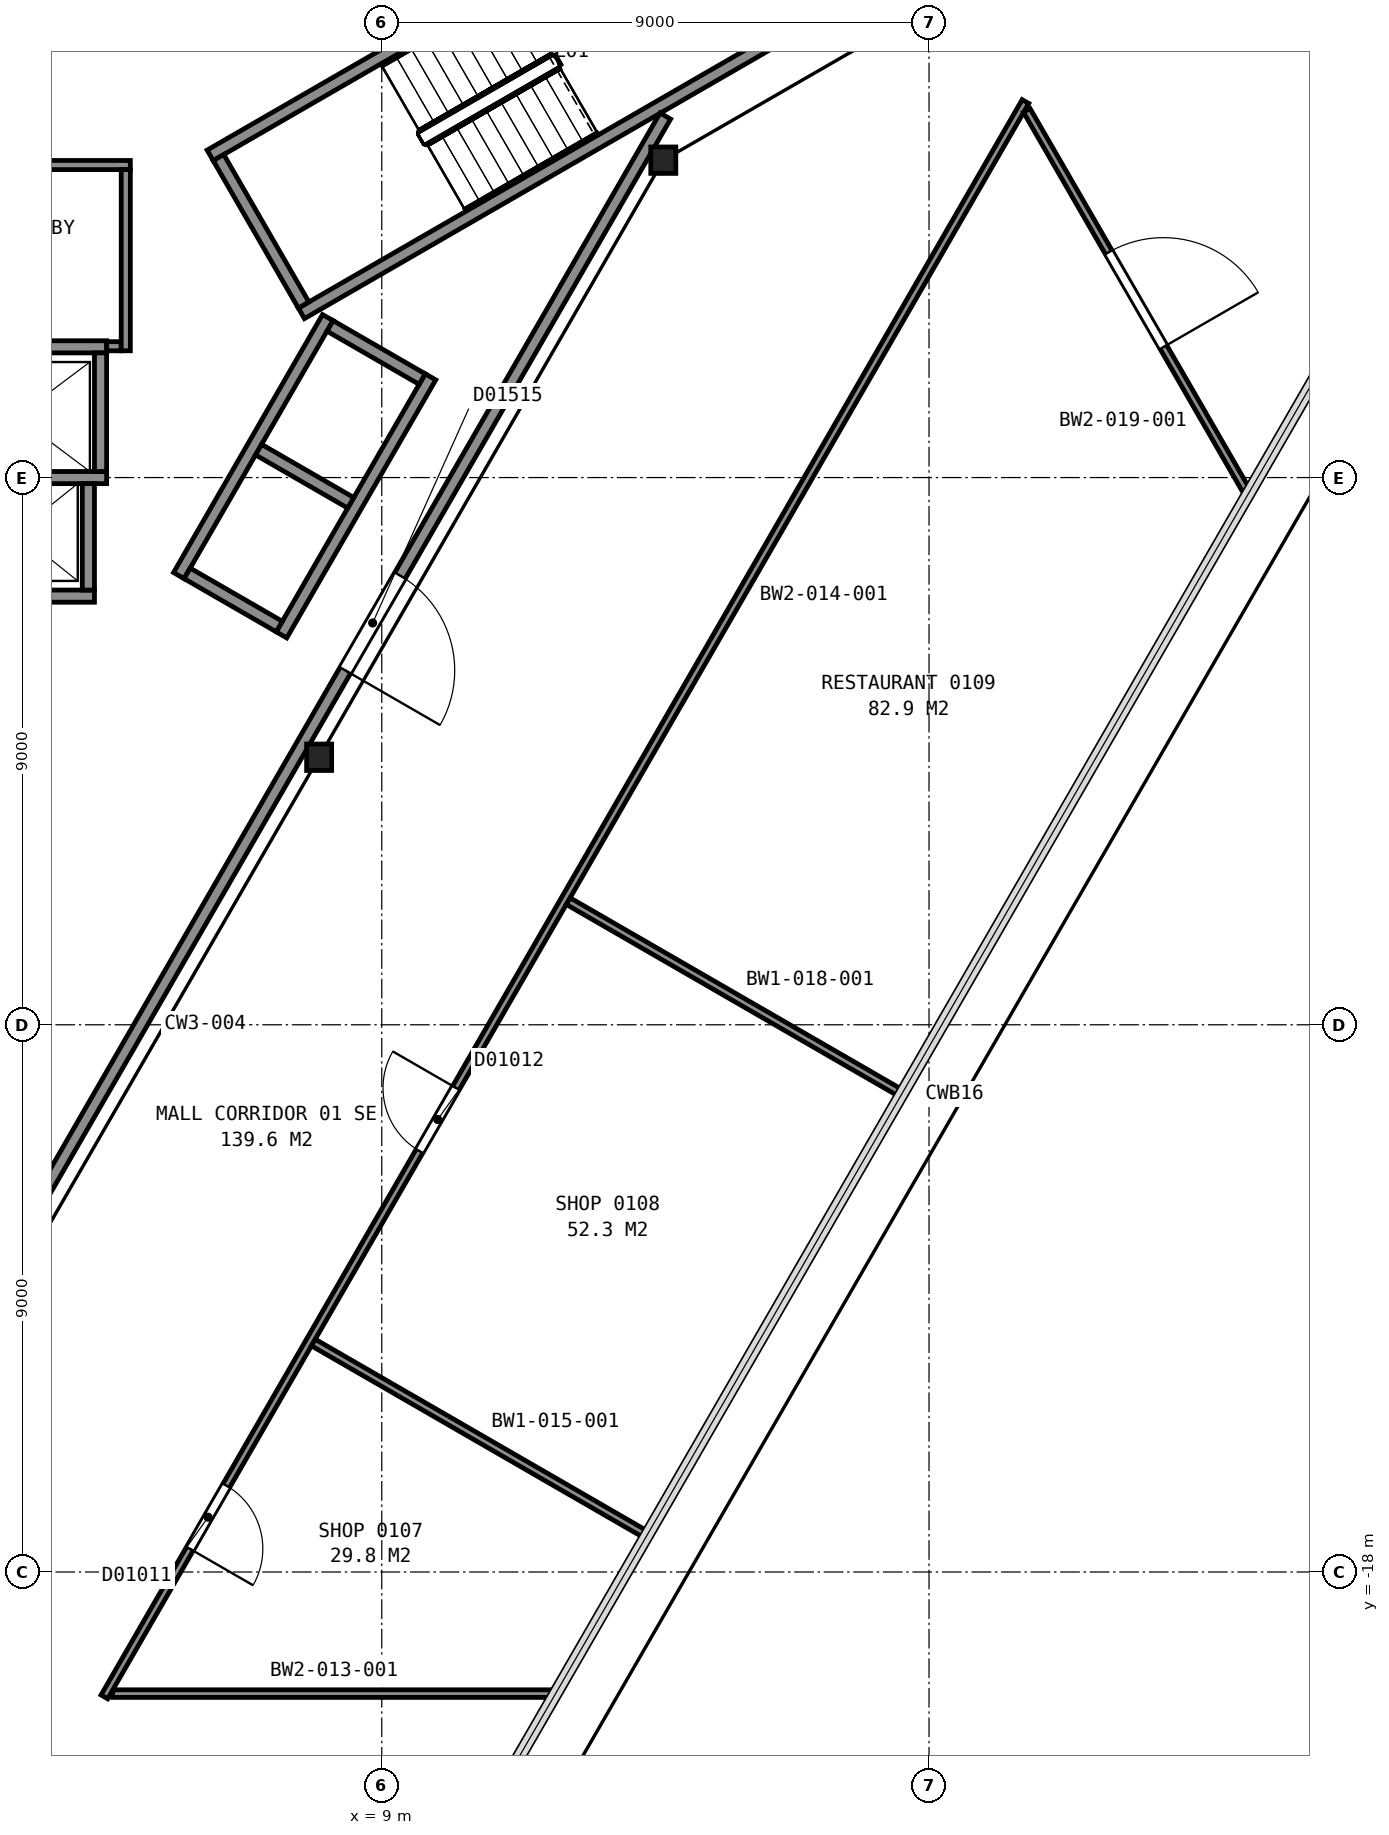
"""IFC4 building model, lengths in metres.
Left out: names, types, materials, properties, quantities, classifications, styles, units other than length and angle.
Written with IfcOpenShell. Run it as: python <this file> out.ifc"""

import sys

from ifc_helpers import new_model, si_unit, direction, frame, frame_2d, origin, origin_2d, place, context, subcontext, project, spatial, rectangle, i_section, extrude, element, fill, save


model = new_model("IFC4")
c1 = context("Model", 3, precision=1e-05, world=origin(), true_north=direction((0.0, 1.0)))
c2 = subcontext(c1, "Body", "Model", "MODEL_VIEW")
j1 = project(units=[si_unit("LENGTHUNIT", "METRE"), si_unit("PLANEANGLEUNIT", "RADIAN")], contexts=[c1])
p1 = place(None, origin())
s1 = spatial("IfcSite", under=j1, at=p1, CompositionType="ELEMENT")
p2 = place(p1, origin())
s2 = spatial("IfcBuilding", under=s1, at=p2, CompositionType="ELEMENT")
p3 = place(p2, frame((0.0, 0.0, 12.0)))
s3 = spatial("IfcBuildingStorey", under=s2, at=p3, CompositionType="ELEMENT", Elevation=12.0)
for number, where, z_axis, x_axis in (
    (1, (13.63, 5.22, 0.0), (0.0, 0.0, 1.0), (1.0, 0.0, 0.0)),
    (2, (7.97, -4.6, 0.0), (0.0, 0.0, 1.0), (1.0, 0.0, 0.0)),
):
    element("IfcColumn", number, at=place(p3, frame(where, z_axis=z_axis, x_axis=x_axis)), inside=s3, PredefinedType="COLUMN", context=c2, shape_type="SweptSolid", body=[
        extrude(i_section(OverallWidth=0.411, OverallDepth=0.434, WebThickness=0.036, FlangeThickness=0.057, FilletRadius=0.015, at=origin_2d()), origin(), (0.0, 0.0, 1.0), 5.4),
    ])
for number, where, z_axis, x_axis in (
    (3, (6.178, 5.299, 0.0), (0.0, 0.0, 1.0), (0.866, 0.5, 0.0)),
    (4, (7.678, 2.701, 0.0), (0.0, 0.0, 1.0), (0.866, 0.5, 0.0)),
):
    element("IfcWall", number, at=place(p3, frame(where, z_axis=z_axis, x_axis=x_axis)), inside=s3, PredefinedType="PARTITIONING", context=c2, shape_type="SweptSolid", body=[
        extrude(rectangle(XDim=12.0, YDim=0.2, at=frame_2d((6.0, 0.0))), origin(), (0.0, 0.0, 1.0), 5.15),
    ])
p4 = place(p3, frame((7.715, 2.838, 0.0), z_axis=(0.0, 0.0, 1.0), x_axis=(-0.500049511043, 0.865996816683, 0.0)))
e5 = element("IfcWall", 5, at=p4, inside=s3, PredefinedType="PARTITIONING", context=c2, shape_type="SweptSolid", body=[
    extrude(rectangle(XDim=2.8, YDim=0.2, at=frame_2d((1.4, 0.0))), origin(), (0.0, 0.0, 1.0), 5.15),
])
p5 = place(p3, frame((1.725, -1.95, 0.0), z_axis=(0.0, 0.0, 1.0), x_axis=(1.0, 0.0, 0.0)))
e6 = element("IfcWall", 6, at=p5, inside=s3, PredefinedType="PARTITIONING", context=c2, shape_type="SweptSolid", body=[
    extrude(rectangle(XDim=2.55, YDim=0.2, at=frame_2d((1.275, 0.0))), origin(), (0.0, 0.0, 1.0), 5.4),
])
p6 = place(p5, frame((0.725, 0.0, 0.0)))
e7 = element("IfcOpeningElement", 7, at=p6, cuts=e6, PredefinedType="OPENING", context=c2, shape_type="SweptSolid", body=[
    extrude(rectangle(XDim=1.1, YDim=2.1, at=frame_2d((0.55, 1.05))), frame((0.0, 0.11, 0.0), z_axis=(0.0, -1.0, 0.0), x_axis=(1.0, 0.0, 0.0)), (0.0, 0.0, 1.0), 0.22),
])
p7 = place(p3, frame((1.525, 0.0, 0.0), z_axis=(0.0, 0.0, 1.0), x_axis=(1.0, 0.0, 0.0)))
e8 = element("IfcWall", 8, at=p7, inside=s3, PredefinedType="PARTITIONING", context=c2, shape_type="SweptSolid", body=[
    extrude(rectangle(XDim=2.95, YDim=0.2, at=frame_2d((1.475, 0.0))), origin(), (0.0, 0.0, 1.0), 5.4),
])
p8 = place(p3, frame((1.525, 2.15, 0.0), z_axis=(0.0, 0.0, 1.0), x_axis=(1.0, 0.0, 0.0)))
e9 = element("IfcWall", 9, at=p8, inside=s3, PredefinedType="PARTITIONING", context=c2, shape_type="SweptSolid", body=[
    extrude(rectangle(XDim=2.95, YDim=0.2, at=frame_2d((1.475, 0.0))), origin(), (0.0, 0.0, 1.0), 5.4),
])
p9 = place(p8, frame((0.925, 0.0, 0.0)))
e10 = element("IfcOpeningElement", 10, at=p9, cuts=e9, PredefinedType="OPENING", context=c2, shape_type="SweptSolid", body=[
    extrude(rectangle(XDim=1.1, YDim=2.1, at=frame_2d((0.55, 1.05))), frame((0.0, 0.11, 0.0), z_axis=(0.0, -1.0, 0.0), x_axis=(1.0, 0.0, 0.0)), (0.0, 0.0, 1.0), 0.22),
])
p10 = place(p3, frame((7.351, -2.587, 0.0), z_axis=(0.0, 0.0, 1.0), x_axis=(0.500002801628, 0.866023786258, 0.0)))
e11 = element("IfcWall", 11, at=p10, inside=s3, PredefinedType="PARTITIONING", context=c2, shape_type="SweptSolid", body=[
    extrude(rectangle(XDim=4.9, YDim=0.2, at=frame_2d((2.45, 0.0))), origin(), (0.0, 0.0, 1.0), 5.4),
])
p11 = place(p3, frame((5.663, -1.612, 0.0), z_axis=(0.0, 0.0, 1.0), x_axis=(0.49998122708, 0.866036242063, 0.0)))
e12 = element("IfcWall", 12, at=p11, inside=s3, PredefinedType="PARTITIONING", context=c2, shape_type="SweptSolid", body=[
    extrude(rectangle(XDim=4.9, YDim=0.2, at=frame_2d((2.45, 0.0))), origin(), (0.0, 0.0, 1.0), 5.4),
])
p12 = place(p3, frame((4.375, 0.1, 0.0), z_axis=(0.0, 0.0, 1.0), x_axis=(0.0, 1.0, 0.0)))
e13 = element("IfcWall", 13, at=p12, inside=s3, PredefinedType="PARTITIONING", context=c2, shape_type="SweptSolid", body=[
    extrude(rectangle(XDim=1.95, YDim=0.2, at=frame_2d((0.975, 0.0))), origin(), (0.0, 0.0, 1.0), 5.4),
])
p13 = place(p3, frame((4.175, -1.85, 0.0), z_axis=(0.0, 0.0, 1.0), x_axis=(0.0, 1.0, 0.0)))
e14 = element("IfcWall", 14, at=p13, inside=s3, PredefinedType="PARTITIONING", context=c2, shape_type="SweptSolid", body=[
    extrude(rectangle(XDim=1.75, YDim=0.2, at=frame_2d((0.875, 0.0))), origin(), (0.0, 0.0, 1.0), 5.4),
])
p14 = place(p3, frame((9.665, 1.62, 0.0), z_axis=(0.0, 0.0, 1.0), x_axis=(-0.866002029911, 0.500040482552, 0.0)))
e15 = element("IfcWall", 15, at=p14, inside=s3, PredefinedType="PARTITIONING", context=c2, shape_type="SweptSolid", body=[
    extrude(rectangle(XDim=1.75, YDim=0.2, at=frame_2d((0.875, 0.0))), origin(), (0.0, 0.0, 1.0), 5.4),
])
for number, where, z_axis, x_axis in (
    (16, (8.49, -0.416, 0.0), (0.0, 0.0, 1.0), (-0.866, 0.5, 0.0)),
    (17, (7.315, -2.451, 0.0), (0.0, 0.0, 1.0), (-0.866, 0.5, 0.0)),
):
    element("IfcWall", number, at=place(p3, frame(where, z_axis=z_axis, x_axis=x_axis)), inside=s3, PredefinedType="PARTITIONING", context=c2, shape_type="SweptSolid", body=[
        extrude(rectangle(XDim=1.75, YDim=0.2, at=frame_2d((0.875, 0.0))), origin(), (0.0, 0.0, 1.0), 5.4),
    ])
p15 = place(p3, frame((-0.245, 5.14, 0.0), z_axis=(0.0, 0.0, 1.0), x_axis=(1.0, 0.0, 0.0)))
e18 = element("IfcWall", 18, at=p15, inside=s3, PredefinedType="PARTITIONING", context=c2, shape_type="SweptSolid", body=[
    extrude(rectangle(XDim=5.11, YDim=0.15, at=frame_2d((2.555, 0.0))), origin(), (0.0, 0.0, 1.0), 5.15),
])
p16 = place(p15, frame((1.975, 0.0, 0.0)))
e19 = element("IfcOpeningElement", 19, at=p16, cuts=e18, PredefinedType="OPENING", context=c2, shape_type="SweptSolid", body=[
    extrude(rectangle(XDim=1.0, YDim=2.1, at=frame_2d((0.5, 1.05))), frame((0.0, 0.085, 0.0), z_axis=(0.0, -1.0, 0.0), x_axis=(1.0, 0.0, 0.0)), (0.0, 0.0, 1.0), 0.17),
])
p17 = place(p3, frame((1.68, -14.811, 0.0), z_axis=(0.0, 0.0, 1.0), x_axis=(0.499994327219, 0.866028678941, 0.0)))
e20 = element("IfcWall", 20, at=p17, inside=s3, PredefinedType="PARTITIONING", context=c2, shape_type="SweptSolid", body=[
    extrude(rectangle(XDim=23.968, YDim=0.2, at=frame_2d((11.984, 0.0))), origin(), (0.0, 0.0, 1.0), 5.15),
])
p18 = place(p17, frame((13.44, 0.0, 0.0)))
e21 = element("IfcOpeningElement", 21, at=p18, cuts=e20, PredefinedType="OPENING", context=c2, shape_type="SweptSolid", body=[
    extrude(rectangle(XDim=1.8, YDim=2.1, at=frame_2d((0.9, 1.05))), frame((0.0, 0.11, 0.0), z_axis=(0.0, -1.0, 0.0), x_axis=(1.0, 0.0, 0.0)), (0.0, 0.0, 1.0), 0.22),
])
p19 = place(p3, frame((4.477, 2.16, 0.0), z_axis=(0.0, 0.0, 1.0), x_axis=(1.0, 0.0, 0.0)))
e22 = element("IfcWall", 22, at=p19, inside=s3, PredefinedType="PARTITIONING", context=c2, shape_type="SweptSolid", body=[
    extrude(rectangle(XDim=0.238, YDim=0.15, at=frame_2d((0.119, 0.0))), origin(), (0.0, 0.0, 1.0), 5.15),
])
p20 = place(p3, frame((4.79, 2.085, 0.0), z_axis=(0.0, 0.0, 1.0), x_axis=(0.0, 1.0, 0.0)))
e23 = element("IfcWall", 23, at=p20, inside=s3, PredefinedType="PARTITIONING", context=c2, shape_type="SweptSolid", body=[
    extrude(rectangle(XDim=2.98, YDim=0.15, at=frame_2d((1.49, 0.0))), origin(), (0.0, 0.0, 1.0), 5.15),
])
p21 = place(p3, frame((4.574, -20.0, 0.0), z_axis=(0.0, 0.0, 1.0), x_axis=(1.0, 0.0, 0.0)))
e24 = element("IfcWall", 24, at=p21, inside=s3, PredefinedType="PARTITIONING", context=c2, shape_type="SweptSolid", body=[
    extrude(rectangle(XDim=7.285, YDim=0.125, at=frame_2d((3.643, 0.0))), origin(), (0.0, 0.0, 1.0), 5.24),
])
p22 = place(p3, frame((19.586, 6.184, 0.0), z_axis=(0.0, 0.0, 1.0), x_axis=(-0.499994028088, -0.866028851642, 0.0)))
e25 = element("IfcWall", 25, at=p22, inside=s3, PredefinedType="PARTITIONING", context=c2, shape_type="SweptSolid", body=[
    extrude(rectangle(XDim=30.297, YDim=0.125, at=frame_2d((15.148, 0.0))), origin(), (0.0, 0.0, 1.0), 4.253),
])
p23 = place(p22, frame((26.285, 0.0, 0.0)))
e26 = element("IfcOpeningElement", 26, at=p23, cuts=e25, PredefinedType="OPENING", context=c2, shape_type="SweptSolid", body=[
    extrude(rectangle(XDim=1.2, YDim=2.1, at=frame_2d((0.6, 1.05))), frame((0.0, 0.073, 0.0), z_axis=(0.0, -1.0, 0.0), x_axis=(1.0, 0.0, 0.0)), (0.0, 0.0, 1.0), 0.145),
])
p24 = place(p22, frame((18.732, 0.0, 0.0)))
e27 = element("IfcOpeningElement", 27, at=p24, cuts=e25, PredefinedType="OPENING", context=c2, shape_type="SweptSolid", body=[
    extrude(rectangle(XDim=1.2, YDim=2.1, at=frame_2d((0.6, 1.05))), frame((0.0, 0.073, 0.0), z_axis=(0.0, -1.0, 0.0), x_axis=(1.0, 0.0, 0.0)), (0.0, 0.0, 1.0), 0.145),
])
for number, where, z_axis, x_axis in (
    (28, (7.875, -14.226, 0.0), (0.0, 0.0, 1.0), (0.866, -0.5, 0.0)),
    (29, (12.066, -6.966, 0.0), (0.0, 0.0, 1.0), (0.866, -0.5, 0.0)),
):
    element("IfcWall", number, at=place(p3, frame(where, z_axis=z_axis, x_axis=x_axis)), inside=s3, PredefinedType="PARTITIONING", context=c2, shape_type="SweptSolid", body=[
        extrude(rectangle(XDim=6.337, YDim=0.125, at=frame_2d((3.168, 0.0))), origin(), (0.0, 0.0, 1.0), 4.253),
    ])
p25 = place(p3, frame((23.25, -0.27, 0.0), z_axis=(0.0, 0.0, 1.0), x_axis=(-0.500002873931, 0.866023744513, 0.0)))
e30 = element("IfcWall", 30, at=p25, inside=s3, PredefinedType="PARTITIONING", context=c2, shape_type="SweptSolid", body=[
    extrude(rectangle(XDim=7.285, YDim=0.125, at=frame_2d((3.643, 0.0))), origin(), (0.0, 0.0, 1.0), 5.24),
])
p26 = place(p25, frame((2.79, 0.0, 0.0)))
e31 = element("IfcOpeningElement", 31, at=p26, cuts=e30, PredefinedType="OPENING", context=c2, shape_type="SweptSolid", body=[
    extrude(rectangle(XDim=1.8, YDim=2.4, at=frame_2d((0.9, 1.2))), frame((0.0, 0.073, 0.0), z_axis=(0.0, -1.0, 0.0), x_axis=(1.0, 0.0, 0.0)), (0.0, 0.0, 1.0), 0.145),
])
p27 = place(p18, origin())
e32 = element("IfcDoor", 32, at=p27, inside=s3, OperationType="DOUBLE_DOOR_SINGLE_SWING", PredefinedType="DOOR", context=c2, shape_type="SweptSolid", body=[
    extrude(rectangle(XDim=1.8, YDim=2.1, at=frame_2d((0.9, 1.05))), frame((0.0, 0.025, 0.0), z_axis=(0.0, -1.0, 0.0), x_axis=(1.0, 0.0, 0.0)), (0.0, 0.0, 1.0), 0.05),
])
fill(e21, e32)
p28 = place(p23, origin())
e33 = element("IfcDoor", 33, at=p28, inside=s3, OperationType="SINGLE_SWING_RIGHT", PredefinedType="DOOR", context=c2, shape_type="SweptSolid", body=[
    extrude(rectangle(XDim=1.2, YDim=2.1, at=frame_2d((0.6, 1.05))), frame((0.0, 0.025, 0.0), z_axis=(0.0, -1.0, 0.0), x_axis=(1.0, 0.0, 0.0)), (0.0, 0.0, 1.0), 0.05),
])
fill(e26, e33)
p29 = place(p24, origin())
e34 = element("IfcDoor", 34, at=p29, inside=s3, OperationType="SINGLE_SWING_LEFT", PredefinedType="DOOR", context=c2, shape_type="SweptSolid", body=[
    extrude(rectangle(XDim=1.2, YDim=2.1, at=frame_2d((0.6, 1.05))), frame((0.0, 0.025, 0.0), z_axis=(0.0, -1.0, 0.0), x_axis=(1.0, 0.0, 0.0)), (0.0, 0.0, 1.0), 0.05),
])
fill(e27, e34)
p30 = place(p26, origin())
e35 = element("IfcDoor", 35, at=p30, inside=s3, OperationType="DOUBLE_DOOR_SINGLE_SWING", PredefinedType="DOOR", context=c2, shape_type="SweptSolid", body=[
    extrude(rectangle(XDim=1.8, YDim=2.4, at=frame_2d((0.9, 1.2))), frame((0.0, 0.025, 0.0), z_axis=(0.0, -1.0, 0.0), x_axis=(1.0, 0.0, 0.0)), (0.0, 0.0, 1.0), 0.05),
])
fill(e31, e35)
save(model, sys.argv[1])
